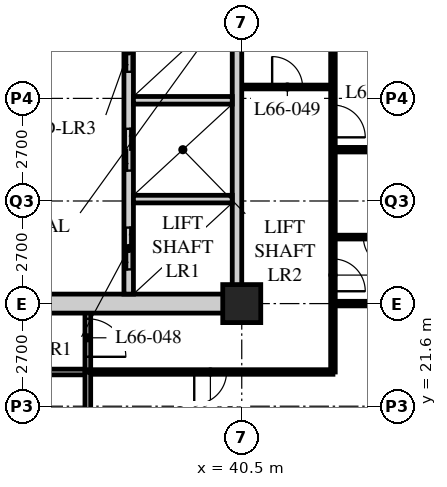
"""IFC4 building model, lengths in metres.
Left out: names, types, materials, properties, quantities, classifications, styles, units other than length and angle.
Written with IfcOpenShell. Run it as: python <this file> out.ifc"""

import sys

from ifc_helpers import new_model, si_unit, direction, frame, frame_2d, origin, origin_2d, place, context, subcontext, project, spatial, rectangle, hollow_rectangle, extrude, element, fill, save


model = new_model("IFC4")
c1 = context("Model", 3, precision=1e-05, world=origin(), true_north=direction((0.0, 1.0)))
c2 = subcontext(c1, "Body", "Model", "MODEL_VIEW")
j1 = project(units=[si_unit("LENGTHUNIT", "METRE"), si_unit("PLANEANGLEUNIT", "RADIAN")], contexts=[c1])
p1 = place(None, origin())
s1 = spatial("IfcSite", under=j1, at=p1, CompositionType="ELEMENT")
p2 = place(p1, origin())
s2 = spatial("IfcBuilding", under=s1, at=p2, CompositionType="ELEMENT")
p3 = place(p2, frame((0.0, 0.0, 258.0)))
s3 = spatial("IfcBuildingStorey", under=s2, at=p3, CompositionType="ELEMENT", Elevation=258.0)
p4 = place(p3, frame((40.5, 24.3, 0.0), z_axis=(0.0, 0.0, 1.0), x_axis=(1.0, 0.0, 0.0)))
e1 = element("IfcColumn", 1, at=p4, inside=s3, PredefinedType="COLUMN", context=c2, shape_type="SweptSolid", body=[
    extrude(hollow_rectangle(XDim=1.0, YDim=1.0, WallThickness=0.1, at=origin_2d()), origin(), (0.0, 0.0, 1.0), 3.9),
])
p5 = place(p3, frame((8.1, 22.5, 0.0), z_axis=(0.0, 0.0, 1.0), x_axis=(1.0, 0.0, 0.0)))
e2 = element("IfcWall", 2, at=p5, inside=s3, PredefinedType="PARTITIONING", context=c2, shape_type="SweptSolid", body=[
    extrude(rectangle(XDim=28.35, YDim=0.15, at=frame_2d((14.175, 0.0))), origin(), (0.0, 0.0, 1.0), 3.69),
])
p6 = place(p5, frame((4.45, 0.0, 0.0)))
e3 = element("IfcOpeningElement", 3, at=p6, cuts=e2, PredefinedType="OPENING", context=c2, shape_type="SweptSolid", body=[
    extrude(rectangle(XDim=1.0, YDim=2.1, at=frame_2d((0.5, 1.05))), frame((0.0, 0.085, 0.0), z_axis=(0.0, -1.0, 0.0), x_axis=(1.0, 0.0, 0.0)), (0.0, 0.0, 1.0), 0.17),
])
p7 = place(p5, frame((12.55, 0.0, 0.0)))
e4 = element("IfcOpeningElement", 4, at=p7, cuts=e2, PredefinedType="OPENING", context=c2, shape_type="SweptSolid", body=[
    extrude(rectangle(XDim=1.0, YDim=2.1, at=frame_2d((0.5, 1.05))), frame((0.0, 0.085, 0.0), z_axis=(0.0, -1.0, 0.0), x_axis=(1.0, 0.0, 0.0)), (0.0, 0.0, 1.0), 0.17),
])
p8 = place(p5, frame((20.65, 0.0, 0.0)))
e5 = element("IfcOpeningElement", 5, at=p8, cuts=e2, PredefinedType="OPENING", context=c2, shape_type="SweptSolid", body=[
    extrude(rectangle(XDim=1.0, YDim=2.1, at=frame_2d((0.5, 1.05))), frame((0.0, 0.085, 0.0), z_axis=(0.0, -1.0, 0.0), x_axis=(1.0, 0.0, 0.0)), (0.0, 0.0, 1.0), 0.17),
])
p9 = place(p5, frame((2.625, 0.0, 0.0)))
e6 = element("IfcOpeningElement", 6, at=p9, cuts=e2, PredefinedType="OPENING", context=c2, shape_type="SweptSolid", body=[
    extrude(rectangle(XDim=1.0, YDim=2.1, at=frame_2d((0.5, 1.05))), frame((0.0, 0.085, 0.0), z_axis=(0.0, -1.0, 0.0), x_axis=(1.0, 0.0, 0.0)), (0.0, 0.0, 1.0), 0.17),
])
p10 = place(p3, frame((36.45, 22.5, 0.0), z_axis=(0.0, 0.0, 1.0), x_axis=(0.0, 1.0, 0.0)))
e7 = element("IfcWall", 7, at=p10, inside=s3, PredefinedType="PARTITIONING", context=c2, shape_type="SweptSolid", body=[
    extrude(rectangle(XDim=1.8, YDim=0.15, at=frame_2d((0.9, 0.0))), origin(), (0.0, 0.0, 1.0), 3.69),
])
p11 = place(p10, frame((0.4, 0.0, 0.0)))
e8 = element("IfcOpeningElement", 8, at=p11, cuts=e7, PredefinedType="OPENING", context=c2, shape_type="SweptSolid", body=[
    extrude(rectangle(XDim=1.0, YDim=2.1, at=frame_2d((0.5, 1.05))), frame((0.0, 0.085, 0.0), z_axis=(0.0, -1.0, 0.0), x_axis=(1.0, 0.0, 0.0)), (0.0, 0.0, 1.0), 0.17),
])
p12 = place(p3, frame((40.5, 30.0, 0.0), z_axis=(0.0, 0.0, 1.0), x_axis=(1.0, 0.0, 0.0)))
e9 = element("IfcWall", 9, at=p12, inside=s3, PredefinedType="PARTITIONING", context=c2, shape_type="SweptSolid", body=[
    extrude(rectangle(XDim=2.4, YDim=0.1, at=frame_2d((1.2, 0.0))), origin(), (0.0, 0.0, 1.0), 3.69),
])
p13 = place(p12, frame((0.8, 0.0, 0.0)))
e10 = element("IfcOpeningElement", 10, at=p13, cuts=e9, PredefinedType="OPENING", context=c2, shape_type="SweptSolid", body=[
    extrude(rectangle(XDim=0.8, YDim=2.1, at=frame_2d((0.4, 1.05))), frame((0.0, 0.06, 0.0), z_axis=(0.0, -1.0, 0.0), x_axis=(1.0, 0.0, 0.0)), (0.0, 0.0, 1.0), 0.12),
])
p14 = place(p3, frame((42.9, 22.5, 0.0), z_axis=(0.0, 0.0, 1.0), x_axis=(0.0, 1.0, 0.0)))
e11 = element("IfcWall", 11, at=p14, inside=s3, PredefinedType="PARTITIONING", context=c2, shape_type="SweptSolid", body=[
    extrude(rectangle(XDim=9.9, YDim=0.12, at=frame_2d((4.95, 0.0))), origin(), (0.0, 0.0, 1.0), 3.69),
])
p15 = place(p14, frame((2.125, 0.0, 0.0)))
e12 = element("IfcOpeningElement", 12, at=p15, cuts=e11, PredefinedType="OPENING", context=c2, shape_type="SweptSolid", body=[
    extrude(rectangle(XDim=0.85, YDim=2.1, at=frame_2d((0.425, 1.05))), frame((0.0, 0.07, 0.0), z_axis=(0.0, -1.0, 0.0), x_axis=(1.0, 0.0, 0.0)), (0.0, 0.0, 1.0), 0.14),
])
p16 = place(p14, frame((6.175, 0.0, 0.0)))
e13 = element("IfcOpeningElement", 13, at=p16, cuts=e11, PredefinedType="OPENING", context=c2, shape_type="SweptSolid", body=[
    extrude(rectangle(XDim=0.85, YDim=2.1, at=frame_2d((0.425, 1.05))), frame((0.0, 0.07, 0.0), z_axis=(0.0, -1.0, 0.0), x_axis=(1.0, 0.0, 0.0)), (0.0, 0.0, 1.0), 0.14),
])
p17 = place(p3, frame((36.45, 22.5, 0.0), z_axis=(0.0, 0.0, 1.0), x_axis=(1.0, 0.0, 0.0)))
e14 = element("IfcWall", 14, at=p17, inside=s3, PredefinedType="PARTITIONING", context=c2, shape_type="SweptSolid", body=[
    extrude(rectangle(XDim=6.45, YDim=0.12, at=frame_2d((3.225, 0.0))), origin(), (0.0, 0.0, 1.0), 3.69),
])
p18 = place(p17, frame((2.8, 0.0, 0.0)))
e15 = element("IfcOpeningElement", 15, at=p18, cuts=e14, PredefinedType="OPENING", context=c2, shape_type="SweptSolid", body=[
    extrude(rectangle(XDim=0.85, YDim=2.1, at=frame_2d((0.425, 1.05))), frame((0.0, 0.07, 0.0), z_axis=(0.0, -1.0, 0.0), x_axis=(1.0, 0.0, 0.0)), (0.0, 0.0, 1.0), 0.14),
])
p19 = place(p3, frame((42.9, 24.3, 0.0), z_axis=(0.0, 0.0, 1.0), x_axis=(1.0, 0.0, 0.0)))
e16 = element("IfcWall", 16, at=p19, inside=s3, PredefinedType="PARTITIONING", context=c2, shape_type="SweptSolid", body=[
    extrude(rectangle(XDim=9.45, YDim=0.12, at=frame_2d((4.725, 0.0))), origin(), (0.0, 0.0, 1.0), 3.078),
])
p20 = place(p3, frame((36.45, 16.5, 0.0), z_axis=(0.0, 0.0, 1.0), x_axis=(0.0, 1.0, 0.0)))
e17 = element("IfcWall", 17, at=p20, inside=s3, PredefinedType="PARTITIONING", context=c2, shape_type="SweptSolid", body=[
    extrude(rectangle(XDim=6.0, YDim=0.15, at=frame_2d((3.0, 0.0))), origin(), (0.0, 0.0, 1.0), 3.69),
])
p21 = place(p3, frame((42.9, 26.05, 0.0), z_axis=(0.0, 0.0, 1.0), x_axis=(1.0, 0.0, 0.0)))
e18 = element("IfcWall", 18, at=p21, inside=s3, PredefinedType="PARTITIONING", context=c2, shape_type="SweptSolid", body=[
    extrude(rectangle(XDim=2.4, YDim=0.1, at=frame_2d((1.2, 0.0))), origin(), (0.0, 0.0, 1.0), 3.69),
])
p22 = place(p21, frame((0.8, 0.0, 0.0)))
e19 = element("IfcOpeningElement", 19, at=p22, cuts=e18, PredefinedType="OPENING", context=c2, shape_type="SweptSolid", body=[
    extrude(rectangle(XDim=0.8, YDim=2.1, at=frame_2d((0.4, 1.05))), frame((0.0, 0.06, 0.0), z_axis=(0.0, -1.0, 0.0), x_axis=(1.0, 0.0, 0.0)), (0.0, 0.0, 1.0), 0.12),
])
p23 = place(p3, frame((42.9, 28.35, 0.0), z_axis=(0.0, 0.0, 1.0), x_axis=(1.0, 0.0, 0.0)))
e20 = element("IfcWall", 20, at=p23, inside=s3, PredefinedType="PARTITIONING", context=c2, shape_type="SweptSolid", body=[
    extrude(rectangle(XDim=13.5, YDim=0.12, at=frame_2d((6.75, 0.0))), origin(), (0.0, 0.0, 1.0), 3.69),
])
p24 = place(p3, frame((15.95, 24.3, 0.0), z_axis=(0.0, 0.0, 1.0), x_axis=(1.0, 0.0, 0.0)))
e21 = element("IfcWall", 21, at=p24, inside=s3, PredefinedType="SOLIDWALL", context=c2, shape_type="SweptSolid", body=[
    extrude(rectangle(XDim=24.55, YDim=0.5, at=frame_2d((12.275, 0.0))), origin(), (0.0, 0.0, 1.0), 3.04),
])
p25 = place(p24, frame((11.5, 0.0, 0.0)))
e22 = element("IfcOpeningElement", 22, at=p25, cuts=e21, PredefinedType="OPENING", context=c2, shape_type="SweptSolid", body=[
    extrude(rectangle(XDim=1.8, YDim=2.4, at=frame_2d((0.9, 1.2))), frame((0.0, 0.26, 0.0), z_axis=(0.0, -1.0, 0.0), x_axis=(1.0, 0.0, 0.0)), (0.0, 0.0, 1.0), 0.52),
])
p26 = place(p3, frame((40.375, 24.55, 0.0), z_axis=(0.0, 0.0, 1.0), x_axis=(0.0, 1.0, 0.0)))
e23 = element("IfcWall", 23, at=p26, inside=s3, PredefinedType="SOLIDWALL", context=c2, shape_type="SweptSolid", body=[
    extrude(rectangle(XDim=15.7, YDim=0.25, at=frame_2d((7.85, 0.0))), origin(), (0.0, 0.0, 1.0), 3.078),
])
p27 = place(p3, frame((37.525, 24.55, 0.0), z_axis=(0.0, 0.0, 1.0), x_axis=(0.0, 1.0, 0.0)))
e24 = element("IfcWall", 24, at=p27, inside=s3, PredefinedType="SOLIDWALL", context=c2, shape_type="SweptSolid", body=[
    extrude(rectangle(XDim=7.75, YDim=0.25, at=frame_2d((3.875, 0.0))), origin(), (0.0, 0.0, 1.0), 3.69),
])
p28 = place(p27, frame((0.65, 0.0, 0.0)))
e25 = element("IfcOpeningElement", 25, at=p28, cuts=e24, PredefinedType="OPENING", context=c2, shape_type="SweptSolid", body=[
    extrude(rectangle(XDim=1.1, YDim=2.4, at=frame_2d((0.55, 1.2))), frame((0.0, 0.135, 0.0), z_axis=(0.0, -1.0, 0.0), x_axis=(1.0, 0.0, 0.0)), (0.0, 0.0, 1.0), 0.27),
])
p29 = place(p27, frame((3.25, 0.0, 0.0)))
e26 = element("IfcOpeningElement", 26, at=p29, cuts=e24, PredefinedType="OPENING", context=c2, shape_type="SweptSolid", body=[
    extrude(rectangle(XDim=1.1, YDim=2.4, at=frame_2d((0.55, 1.2))), frame((0.0, 0.135, 0.0), z_axis=(0.0, -1.0, 0.0), x_axis=(1.0, 0.0, 0.0)), (0.0, 0.0, 1.0), 0.27),
])
p30 = place(p27, frame((5.85, 0.0, 0.0)))
e27 = element("IfcOpeningElement", 27, at=p30, cuts=e24, PredefinedType="OPENING", context=c2, shape_type="SweptSolid", body=[
    extrude(rectangle(XDim=1.1, YDim=2.4, at=frame_2d((0.55, 1.2))), frame((0.0, 0.135, 0.0), z_axis=(0.0, -1.0, 0.0), x_axis=(1.0, 0.0, 0.0)), (0.0, 0.0, 1.0), 0.27),
])
for number, where, z_axis, x_axis in (
    (28, (37.65, 27.05, 0.0), (0.0, 0.0, 1.0), (1.0, 0.0, 0.0)),
    (29, (37.65, 29.65, 0.0), (0.0, 0.0, 1.0), (1.0, 0.0, 0.0)),
):
    element("IfcWall", number, at=place(p3, frame(where, z_axis=z_axis, x_axis=x_axis)), inside=s3, PredefinedType="SOLIDWALL", context=c2, shape_type="SweptSolid", body=[
        extrude(rectangle(XDim=2.6, YDim=0.2, at=frame_2d((1.3, 0.0))), origin(), (0.0, 0.0, 1.0), 3.69),
    ])
p31 = place(p11, origin())
e30 = element("IfcDoor", 30, at=p31, inside=s3, OperationType="SINGLE_SWING_RIGHT", PredefinedType="DOOR", context=c2, shape_type="SweptSolid", body=[
    extrude(rectangle(XDim=1.0, YDim=2.1, at=frame_2d((0.5, 1.05))), frame((0.0, 0.025, 0.0), z_axis=(0.0, -1.0, 0.0), x_axis=(1.0, 0.0, 0.0)), (0.0, 0.0, 1.0), 0.05),
])
fill(e8, e30)
p32 = place(p13, origin())
e31 = element("IfcDoor", 31, at=p32, inside=s3, OperationType="SINGLE_SWING_LEFT", PredefinedType="DOOR", context=c2, shape_type="SweptSolid", body=[
    extrude(rectangle(XDim=0.8, YDim=2.1, at=frame_2d((0.4, 1.05))), frame((0.0, 0.025, 0.0), z_axis=(0.0, -1.0, 0.0), x_axis=(1.0, 0.0, 0.0)), (0.0, 0.0, 1.0), 0.05),
])
fill(e10, e31)
p33 = place(p18, origin())
e32 = element("IfcDoor", 32, at=p33, inside=s3, OperationType="SINGLE_SWING_RIGHT", PredefinedType="DOOR", context=c2, shape_type="SweptSolid", body=[
    extrude(rectangle(XDim=0.85, YDim=2.1, at=frame_2d((0.425, 1.05))), frame((0.0, 0.025, 0.0), z_axis=(0.0, -1.0, 0.0), x_axis=(1.0, 0.0, 0.0)), (0.0, 0.0, 1.0), 0.05),
])
fill(e15, e32)
p34 = place(p22, origin())
e33 = element("IfcDoor", 33, at=p34, inside=s3, OperationType="SINGLE_SWING_LEFT", PredefinedType="DOOR", context=c2, shape_type="SweptSolid", body=[
    extrude(rectangle(XDim=0.8, YDim=2.1, at=frame_2d((0.4, 1.05))), frame((0.0, 0.025, 0.0), z_axis=(0.0, -1.0, 0.0), x_axis=(1.0, 0.0, 0.0)), (0.0, 0.0, 1.0), 0.05),
])
fill(e19, e33)
p35 = place(p15, origin())
e34 = element("IfcDoor", 34, at=p35, inside=s3, OperationType="SINGLE_SWING_RIGHT", PredefinedType="DOOR", context=c2, shape_type="SweptSolid", body=[
    extrude(rectangle(XDim=0.85, YDim=2.1, at=frame_2d((0.425, 1.05))), frame((0.0, 0.025, 0.0), z_axis=(0.0, -1.0, 0.0), x_axis=(1.0, 0.0, 0.0)), (0.0, 0.0, 1.0), 0.05),
])
fill(e12, e34)
p36 = place(p16, origin())
e35 = element("IfcDoor", 35, at=p36, inside=s3, OperationType="SINGLE_SWING_RIGHT", PredefinedType="DOOR", context=c2, shape_type="SweptSolid", body=[
    extrude(rectangle(XDim=0.85, YDim=2.1, at=frame_2d((0.425, 1.05))), frame((0.0, 0.025, 0.0), z_axis=(0.0, -1.0, 0.0), x_axis=(1.0, 0.0, 0.0)), (0.0, 0.0, 1.0), 0.05),
])
fill(e13, e35)
p37 = place(p28, origin())
e36 = element("IfcDoor", 36, at=p37, inside=s3, OperationType="DOUBLE_DOOR_SLIDING", PredefinedType="DOOR", context=c2, shape_type="SweptSolid", body=[
    extrude(rectangle(XDim=1.1, YDim=2.4, at=frame_2d((0.55, 1.2))), frame((0.0, 0.025, 0.0), z_axis=(0.0, -1.0, 0.0), x_axis=(1.0, 0.0, 0.0)), (0.0, 0.0, 1.0), 0.05),
])
fill(e25, e36)
p38 = place(p29, origin())
e37 = element("IfcDoor", 37, at=p38, inside=s3, OperationType="DOUBLE_DOOR_SLIDING", PredefinedType="DOOR", context=c2, shape_type="SweptSolid", body=[
    extrude(rectangle(XDim=1.1, YDim=2.4, at=frame_2d((0.55, 1.2))), frame((0.0, 0.025, 0.0), z_axis=(0.0, -1.0, 0.0), x_axis=(1.0, 0.0, 0.0)), (0.0, 0.0, 1.0), 0.05),
])
fill(e26, e37)
p39 = place(p30, origin())
e38 = element("IfcDoor", 38, at=p39, inside=s3, OperationType="DOUBLE_DOOR_SLIDING", PredefinedType="DOOR", context=c2, shape_type="SweptSolid", body=[
    extrude(rectangle(XDim=1.1, YDim=2.4, at=frame_2d((0.55, 1.2))), frame((0.0, 0.025, 0.0), z_axis=(0.0, -1.0, 0.0), x_axis=(1.0, 0.0, 0.0)), (0.0, 0.0, 1.0), 0.05),
])
fill(e27, e38)
save(model, sys.argv[1])
